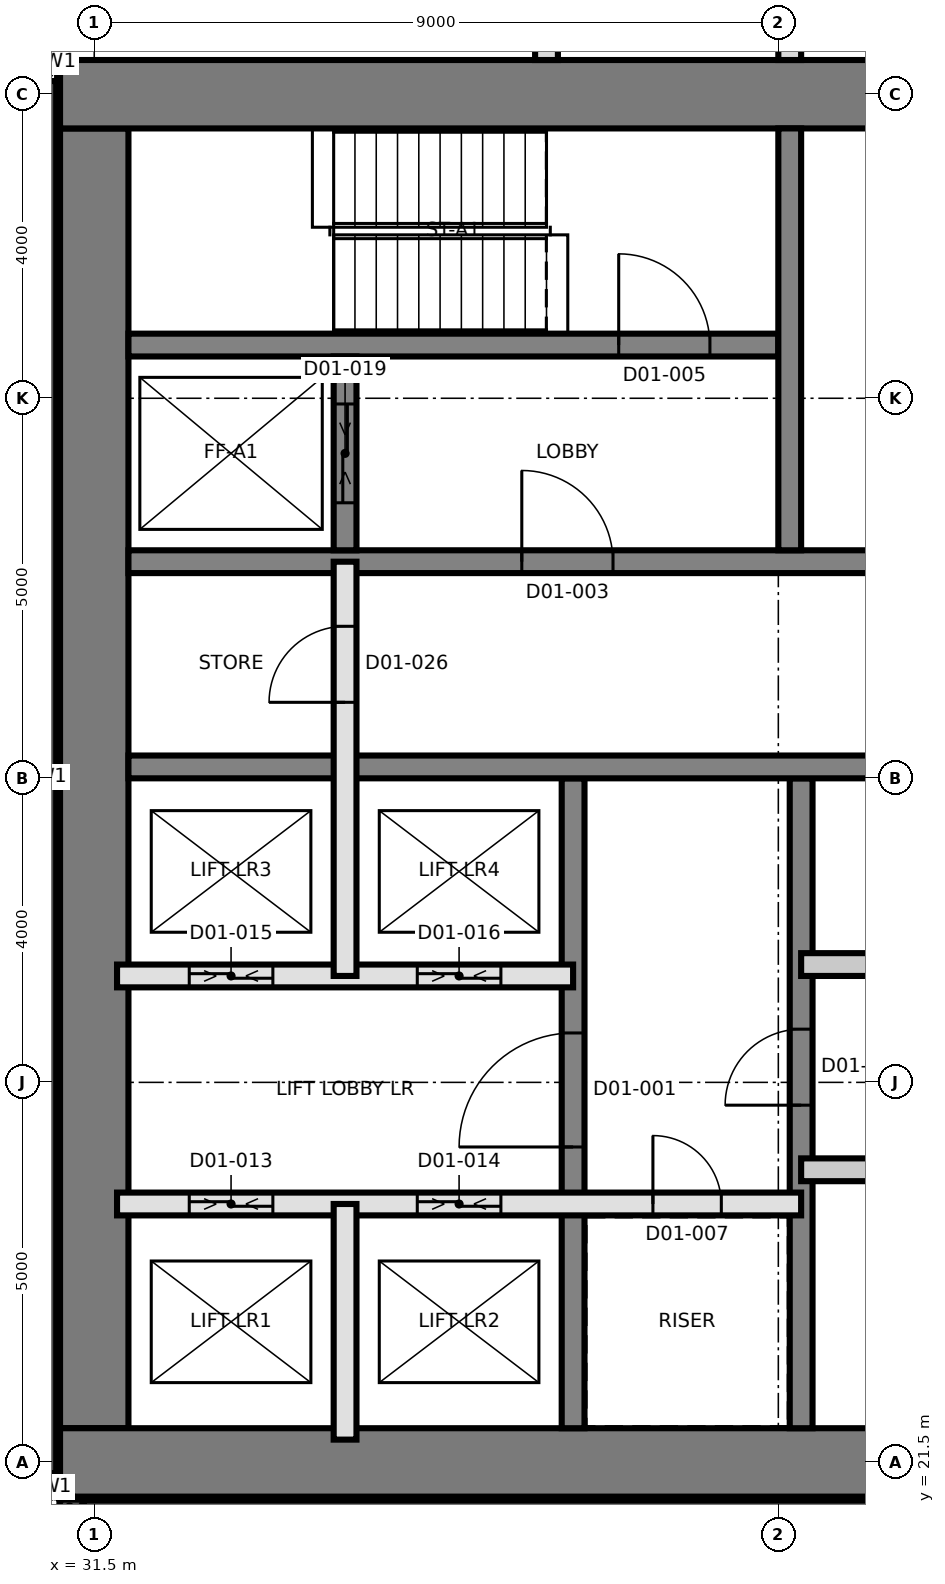
"""IFC4 building model, lengths in metres.
Left out: names, types, materials, properties, quantities, classifications, styles, units other than length and angle.
Written with IfcOpenShell. Run it as: python <this file> out.ifc"""

import sys

from ifc_helpers import new_model, si_unit, direction, frame, frame_2d, origin, place, context, subcontext, project, spatial, rectangle, extrude, element, fill, save


model = new_model("IFC4")
c1 = context("Model", 3, precision=1e-05, world=origin(), true_north=direction((0.0, 1.0)))
c2 = subcontext(c1, "Body", "Model", "MODEL_VIEW")
j1 = project(units=[si_unit("LENGTHUNIT", "METRE"), si_unit("PLANEANGLEUNIT", "RADIAN")], contexts=[c1])
p1 = place(None, origin())
s1 = spatial("IfcSite", under=j1, at=p1, CompositionType="ELEMENT")
p2 = place(p1, origin())
s2 = spatial("IfcBuilding", under=s1, at=p2, CompositionType="ELEMENT")
p3 = place(p2, frame((0.0, 0.0, 40.9)))
s3 = spatial("IfcBuildingStorey", under=s2, at=p3, CompositionType="ELEMENT", Elevation=40.9)
p4 = place(p3, frame((31.5, 21.95, 0.0), z_axis=(0.0, 0.0, 1.0), x_axis=(0.0, 1.0, 0.0)))
e1 = element("IfcWall", 1, at=p4, inside=s3, PredefinedType="SHEAR", context=c2, shape_type="SweptSolid", body=[
    extrude(rectangle(XDim=17.1, YDim=0.9, at=frame_2d((8.55, 0.0))), origin(), (0.0, 0.0, 1.0), 3.7),
])
p5 = place(p3, frame((31.05, 21.5, 0.0), z_axis=(0.0, 0.0, 1.0), x_axis=(1.0, 0.0, 0.0)))
e2 = element("IfcWall", 2, at=p5, inside=s3, PredefinedType="SHEAR", context=c2, shape_type="SweptSolid", body=[
    extrude(rectangle(XDim=27.0, YDim=0.9, at=frame_2d((13.5, 0.0))), origin(), (0.0, 0.0, 1.0), 3.7),
])
p6 = place(p3, frame((31.05, 39.5, 0.0), z_axis=(0.0, 0.0, 1.0), x_axis=(1.0, 0.0, 0.0)))
e3 = element("IfcWall", 3, at=p6, inside=s3, PredefinedType="SHEAR", context=c2, shape_type="SweptSolid", body=[
    extrude(rectangle(XDim=27.0, YDim=0.9, at=frame_2d((13.5, 0.0))), origin(), (0.0, 0.0, 1.0), 3.7),
])
p7 = place(p6, frame((10.65, 0.0, 0.0)))
e4 = element("IfcOpeningElement", 4, at=p7, cuts=e3, PredefinedType="OPENING", context=c2, shape_type="SweptSolid", body=[
    extrude(rectangle(XDim=1.2, YDim=2.1, at=frame_2d((0.6, 1.05))), frame((0.0, 0.46, 0.0), z_axis=(0.0, -1.0, 0.0), x_axis=(1.0, 0.0, 0.0)), (0.0, 0.0, 1.0), 0.92),
])
p8 = place(p3, frame((37.8, 21.95, 0.0), z_axis=(0.0, 0.0, 1.0), x_axis=(0.0, 1.0, 0.0)))
e5 = element("IfcWall", 5, at=p8, inside=s3, PredefinedType="SHEAR", context=c2, shape_type="SweptSolid", body=[
    extrude(rectangle(XDim=8.55, YDim=0.3, at=frame_2d((4.275, 0.0))), origin(), (0.0, 0.0, 1.0), 3.7),
])
p9 = place(p8, frame((3.7, 0.0, 0.0)))
e6 = element("IfcOpeningElement", 6, at=p9, cuts=e5, PredefinedType="OPENING", context=c2, shape_type="SweptSolid", body=[
    extrude(rectangle(XDim=1.5, YDim=2.1, at=frame_2d((0.75, 1.05))), frame((0.0, 0.16, 0.0), z_axis=(0.0, -1.0, 0.0), x_axis=(1.0, 0.0, 0.0)), (0.0, 0.0, 1.0), 0.32),
])
p10 = place(p3, frame((40.8, 21.95, 0.0), z_axis=(0.0, 0.0, 1.0), x_axis=(0.0, 1.0, 0.0)))
e7 = element("IfcWall", 7, at=p10, inside=s3, PredefinedType="SHEAR", context=c2, shape_type="SweptSolid", body=[
    extrude(rectangle(XDim=8.55, YDim=0.3, at=frame_2d((4.275, 0.0))), origin(), (0.0, 0.0, 1.0), 3.7),
])
p11 = place(p10, frame((4.25, 0.0, 0.0)))
e8 = element("IfcOpeningElement", 8, at=p11, cuts=e7, PredefinedType="OPENING", context=c2, shape_type="SweptSolid", body=[
    extrude(rectangle(XDim=1.0, YDim=2.1, at=frame_2d((0.5, 1.05))), frame((0.0, 0.16, 0.0), z_axis=(0.0, -1.0, 0.0), x_axis=(1.0, 0.0, 0.0)), (0.0, 0.0, 1.0), 0.32),
])
p12 = place(p3, frame((31.95, 30.65, 0.0), z_axis=(0.0, 0.0, 1.0), x_axis=(1.0, 0.0, 0.0)))
e9 = element("IfcWall", 9, at=p12, inside=s3, PredefinedType="SHEAR", context=c2, shape_type="SweptSolid", body=[
    extrude(rectangle(XDim=26.1, YDim=0.3, at=frame_2d((13.05, 0.0))), origin(), (0.0, 0.0, 1.0), 3.7),
])
p13 = place(p12, frame((24.55, 0.0, 0.0)))
e10 = element("IfcOpeningElement", 10, at=p13, cuts=e9, PredefinedType="OPENING", context=c2, shape_type="SweptSolid", body=[
    extrude(rectangle(XDim=1.0, YDim=2.1, at=frame_2d((0.5, 1.05))), frame((0.0, 0.16, 0.0), z_axis=(0.0, -1.0, 0.0), x_axis=(1.0, 0.0, 0.0)), (0.0, 0.0, 1.0), 0.32),
])
p14 = place(p12, frame((11.35, 0.0, 0.0)))
e11 = element("IfcOpeningElement", 11, at=p14, cuts=e9, PredefinedType="OPENING", context=c2, shape_type="SweptSolid", body=[
    extrude(rectangle(XDim=1.0, YDim=2.1, at=frame_2d((0.5, 1.05))), frame((0.0, 0.16, 0.0), z_axis=(0.0, -1.0, 0.0), x_axis=(1.0, 0.0, 0.0)), (0.0, 0.0, 1.0), 0.32),
])
p15 = place(p3, frame((31.95, 33.35, 0.0), z_axis=(0.0, 0.0, 1.0), x_axis=(1.0, 0.0, 0.0)))
e12 = element("IfcWall", 12, at=p15, inside=s3, PredefinedType="SHEAR", context=c2, shape_type="SweptSolid", body=[
    extrude(rectangle(XDim=26.1, YDim=0.3, at=frame_2d((13.05, 0.0))), origin(), (0.0, 0.0, 1.0), 3.7),
])
p16 = place(p15, frame((13.7, 0.0, 0.0)))
e13 = element("IfcOpeningElement", 13, at=p16, cuts=e12, PredefinedType="OPENING", context=c2, shape_type="SweptSolid", body=[
    extrude(rectangle(XDim=1.4, YDim=2.1, at=frame_2d((0.7, 1.05))), frame((0.0, 0.16, 0.0), z_axis=(0.0, -1.0, 0.0), x_axis=(1.0, 0.0, 0.0)), (0.0, 0.0, 1.0), 0.32),
])
p17 = place(p15, frame((5.175, 0.0, 0.0)))
e14 = element("IfcOpeningElement", 14, at=p17, cuts=e12, PredefinedType="OPENING", context=c2, shape_type="SweptSolid", body=[
    extrude(rectangle(XDim=1.2, YDim=2.1, at=frame_2d((0.6, 1.05))), frame((0.0, 0.16, 0.0), z_axis=(0.0, -1.0, 0.0), x_axis=(1.0, 0.0, 0.0)), (0.0, 0.0, 1.0), 0.32),
])
p18 = place(p15, frame((19.725, 0.0, 0.0)))
e15 = element("IfcOpeningElement", 15, at=p18, cuts=e12, PredefinedType="OPENING", context=c2, shape_type="SweptSolid", body=[
    extrude(rectangle(XDim=1.2, YDim=2.1, at=frame_2d((0.6, 1.05))), frame((0.0, 0.16, 0.0), z_axis=(0.0, -1.0, 0.0), x_axis=(1.0, 0.0, 0.0)), (0.0, 0.0, 1.0), 0.32),
])
p19 = place(p3, frame((31.95, 36.2, 0.0), z_axis=(0.0, 0.0, 1.0), x_axis=(1.0, 0.0, 0.0)))
e16 = element("IfcWall", 16, at=p19, inside=s3, PredefinedType="SHEAR", context=c2, shape_type="SweptSolid", body=[
    extrude(rectangle(XDim=8.55, YDim=0.3, at=frame_2d((4.275, 0.0))), origin(), (0.0, 0.0, 1.0), 3.7),
])
p20 = place(p19, frame((6.45, 0.0, 0.0)))
e17 = element("IfcOpeningElement", 17, at=p20, cuts=e16, PredefinedType="OPENING", context=c2, shape_type="SweptSolid", body=[
    extrude(rectangle(XDim=1.2, YDim=2.1, at=frame_2d((0.6, 1.05))), frame((0.0, 0.16, 0.0), z_axis=(0.0, -1.0, 0.0), x_axis=(1.0, 0.0, 0.0)), (0.0, 0.0, 1.0), 0.32),
])
p21 = place(p3, frame((40.65, 33.5, 0.0), z_axis=(0.0, 0.0, 1.0), x_axis=(0.0, 1.0, 0.0)))
e18 = element("IfcWall", 18, at=p21, inside=s3, PredefinedType="SHEAR", context=c2, shape_type="SweptSolid", body=[
    extrude(rectangle(XDim=5.55, YDim=0.3, at=frame_2d((2.775, 0.0))), origin(), (0.0, 0.0, 1.0), 3.7),
])
p22 = place(p3, frame((34.8, 33.5, 0.0), z_axis=(0.0, 0.0, 1.0), x_axis=(0.0, 1.0, 0.0)))
e19 = element("IfcWall", 19, at=p22, inside=s3, PredefinedType="SHEAR", context=c2, shape_type="SweptSolid", body=[
    extrude(rectangle(XDim=2.55, YDim=0.3, at=frame_2d((1.275, 0.0))), origin(), (0.0, 0.0, 1.0), 3.7),
])
p23 = place(p22, frame((0.625, 0.0, 0.0)))
e20 = element("IfcOpeningElement", 20, at=p23, cuts=e19, PredefinedType="OPENING", context=c2, shape_type="SweptSolid", body=[
    extrude(rectangle(XDim=1.3, YDim=2.4, at=frame_2d((0.65, 1.2))), frame((0.0, 0.16, 0.0), z_axis=(0.0, -1.0, 0.0), x_axis=(1.0, 0.0, 0.0)), (0.0, 0.0, 1.0), 0.32),
])
p24 = place(p3, frame((30.85, 39.674, 0.0), z_axis=(0.0, 0.0, 1.0), x_axis=(0.0, -1.0, 0.0)))
e21 = element("IfcWall", 21, at=p24, inside=s3, PredefinedType="SOLIDWALL", context=c2, shape_type="SweptSolid", body=[
    extrude(rectangle(XDim=18.314, YDim=0.3, at=frame_2d((9.157, 0.0))), origin(), (0.0, 0.0, 1.0), 3.4),
])
for number, where, z_axis, x_axis in (
    (22, (30.861, 21.302, 0.0), (0.0, 0.0, 1.0), (0.383, -0.924, 0.0)),
    (23, (31.048, 20.967, 0.0), (0.0, 0.0, 1.0), (0.924, -0.383, 0.0)),
):
    element("IfcWall", number, at=place(p3, frame(where, z_axis=z_axis, x_axis=x_axis)), inside=s3, PredefinedType="SOLIDWALL", context=c2, shape_type="SweptSolid", body=[
        extrude(rectangle(XDim=0.275, YDim=0.3, at=frame_2d((0.138, 0.0))), origin(), (0.0, 0.0, 1.0), 3.4),
    ])
p25 = place(p3, frame((31.36, 20.85, 0.0), z_axis=(0.0, 0.0, 1.0), x_axis=(1.0, 0.0, 0.0)))
e24 = element("IfcWall", 24, at=p25, inside=s3, PredefinedType="SOLIDWALL", context=c2, shape_type="SweptSolid", body=[
    extrude(rectangle(XDim=27.281, YDim=0.3, at=frame_2d((13.64, 0.0))), origin(), (0.0, 0.0, 1.0), 3.4),
])
p26 = place(p3, frame((31.8, 24.9, 0.0), z_axis=(0.0, 0.0, 1.0), x_axis=(1.0, 0.0, 0.0)))
e25 = element("IfcWall", 25, at=p26, inside=s3, PredefinedType="SOLIDWALL", context=c2, shape_type="SweptSolid", body=[
    extrude(rectangle(XDim=9.0, YDim=0.3, at=frame_2d((4.5, 0.0))), origin(), (0.0, 0.0, 1.0), 3.4),
])
p27 = place(p26, frame((7.05, 0.0, 0.0)))
e26 = element("IfcOpeningElement", 26, at=p27, cuts=e25, PredefinedType="OPENING", context=c2, shape_type="SweptSolid", body=[
    extrude(rectangle(XDim=0.9, YDim=2.1, at=frame_2d((0.45, 1.05))), frame((0.0, 0.16, 0.0), z_axis=(0.0, -1.0, 0.0), x_axis=(1.0, 0.0, 0.0)), (0.0, 0.0, 1.0), 0.32),
])
p28 = place(p26, frame((0.95, 0.0, 0.0)))
e27 = element("IfcOpeningElement", 27, at=p28, cuts=e25, PredefinedType="OPENING", context=c2, shape_type="SweptSolid", body=[
    extrude(rectangle(XDim=1.1, YDim=2.4, at=frame_2d((0.55, 1.2))), frame((0.0, 0.16, 0.0), z_axis=(0.0, -1.0, 0.0), x_axis=(1.0, 0.0, 0.0)), (0.0, 0.0, 1.0), 0.32),
])
p29 = place(p26, frame((3.95, 0.0, 0.0)))
e28 = element("IfcOpeningElement", 28, at=p29, cuts=e25, PredefinedType="OPENING", context=c2, shape_type="SweptSolid", body=[
    extrude(rectangle(XDim=1.1, YDim=2.4, at=frame_2d((0.55, 1.2))), frame((0.0, 0.16, 0.0), z_axis=(0.0, -1.0, 0.0), x_axis=(1.0, 0.0, 0.0)), (0.0, 0.0, 1.0), 0.32),
])
p30 = place(p3, frame((40.8, 25.35, 0.0), z_axis=(0.0, 0.0, 1.0), x_axis=(1.0, 0.0, 0.0)))
e29 = element("IfcWall", 29, at=p30, inside=s3, PredefinedType="PARTITIONING", context=c2, shape_type="SweptSolid", body=[
    extrude(rectangle(XDim=6.0, YDim=0.3, at=frame_2d((3.0, 0.0))), origin(), (0.0, 0.0, 1.0), 3.4),
])
p31 = place(p30, frame((2.5, 0.0, 0.0)))
e30 = element("IfcOpeningElement", 30, at=p31, cuts=e29, PredefinedType="OPENING", context=c2, shape_type="SweptSolid", body=[
    extrude(rectangle(XDim=1.0, YDim=2.1, at=frame_2d((0.5, 1.05))), frame((0.0, 0.16, 0.0), z_axis=(0.0, -1.0, 0.0), x_axis=(1.0, 0.0, 0.0)), (0.0, 0.0, 1.0), 0.32),
])
p32 = place(p3, frame((31.8, 27.9, 0.0), z_axis=(0.0, 0.0, 1.0), x_axis=(1.0, 0.0, 0.0)))
e31 = element("IfcWall", 31, at=p32, inside=s3, PredefinedType="SOLIDWALL", context=c2, shape_type="SweptSolid", body=[
    extrude(rectangle(XDim=6.0, YDim=0.3, at=frame_2d((3.0, 0.0))), origin(), (0.0, 0.0, 1.0), 3.4),
])
p33 = place(p32, frame((0.95, 0.0, 0.0)))
e32 = element("IfcOpeningElement", 32, at=p33, cuts=e31, PredefinedType="OPENING", context=c2, shape_type="SweptSolid", body=[
    extrude(rectangle(XDim=1.1, YDim=2.4, at=frame_2d((0.55, 1.2))), frame((0.0, 0.16, 0.0), z_axis=(0.0, -1.0, 0.0), x_axis=(1.0, 0.0, 0.0)), (0.0, 0.0, 1.0), 0.32),
])
p34 = place(p32, frame((3.95, 0.0, 0.0)))
e33 = element("IfcOpeningElement", 33, at=p34, cuts=e31, PredefinedType="OPENING", context=c2, shape_type="SweptSolid", body=[
    extrude(rectangle(XDim=1.1, YDim=2.4, at=frame_2d((0.55, 1.2))), frame((0.0, 0.16, 0.0), z_axis=(0.0, -1.0, 0.0), x_axis=(1.0, 0.0, 0.0)), (0.0, 0.0, 1.0), 0.32),
])
p35 = place(p3, frame((40.8, 28.05, 0.0), z_axis=(0.0, 0.0, 1.0), x_axis=(1.0, 0.0, 0.0)))
e34 = element("IfcWall", 34, at=p35, inside=s3, PredefinedType="PARTITIONING", context=c2, shape_type="SweptSolid", body=[
    extrude(rectangle(XDim=6.0, YDim=0.3, at=frame_2d((3.0, 0.0))), origin(), (0.0, 0.0, 1.0), 3.4),
])
p36 = place(p3, frame((34.8, 21.8, 0.0), z_axis=(0.0, 0.0, 1.0), x_axis=(0.0, 1.0, 0.0)))
e35 = element("IfcWall", 35, at=p36, inside=s3, PredefinedType="SOLIDWALL", context=c2, shape_type="SweptSolid", body=[
    extrude(rectangle(XDim=3.1, YDim=0.3, at=frame_2d((1.55, 0.0))), origin(), (0.0, 0.0, 1.0), 3.4),
])
p37 = place(p3, frame((34.8, 27.9, 0.0), z_axis=(0.0, 0.0, 1.0), x_axis=(0.0, 1.0, 0.0)))
e36 = element("IfcWall", 36, at=p37, inside=s3, PredefinedType="SOLIDWALL", context=c2, shape_type="SweptSolid", body=[
    extrude(rectangle(XDim=5.45, YDim=0.3, at=frame_2d((2.725, 0.0))), origin(), (0.0, 0.0, 1.0), 3.4),
])
p38 = place(p37, frame((3.6, 0.0, 0.0)))
e37 = element("IfcOpeningElement", 37, at=p38, cuts=e36, PredefinedType="OPENING", context=c2, shape_type="SweptSolid", body=[
    extrude(rectangle(XDim=1.0, YDim=2.1, at=frame_2d((0.5, 1.05))), frame((0.0, 0.16, 0.0), z_axis=(0.0, -1.0, 0.0), x_axis=(1.0, 0.0, 0.0)), (0.0, 0.0, 1.0), 0.32),
])
p39 = place(p3, frame((37.45, 39.95, 0.0), z_axis=(0.0, 0.0, 1.0), x_axis=(0.0, 1.0, 0.0)))
e38 = element("IfcWall", 38, at=p39, inside=s3, PredefinedType="PARTITIONING", context=c2, shape_type="SweptSolid", body=[
    extrude(rectangle(XDim=2.25, YDim=0.3, at=frame_2d((1.125, 0.0))), origin(), (0.0, 0.0, 1.0), 3.4),
])
p40 = place(p39, frame((0.5, 0.0, 0.0)))
e39 = element("IfcOpeningElement", 39, at=p40, cuts=e38, PredefinedType="OPENING", context=c2, shape_type="SweptSolid", body=[
    extrude(rectangle(XDim=0.8, YDim=2.1, at=frame_2d((0.4, 1.05))), frame((0.0, 0.16, 0.0), z_axis=(0.0, -1.0, 0.0), x_axis=(1.0, 0.0, 0.0)), (0.0, 0.0, 1.0), 0.32),
])
p41 = place(p3, frame((40.65, 39.95, 0.0), z_axis=(0.0, 0.0, 1.0), x_axis=(0.0, 1.0, 0.0)))
e40 = element("IfcWall", 40, at=p41, inside=s3, PredefinedType="PARTITIONING", context=c2, shape_type="SweptSolid", body=[
    extrude(rectangle(XDim=35.625, YDim=0.3, at=frame_2d((17.812, 0.0))), origin(), (0.0, 0.0, 1.0), 3.4),
])
p42 = place(p41, frame((2.83, 0.0, 0.0)))
e41 = element("IfcOpeningElement", 41, at=p42, cuts=e40, PredefinedType="OPENING", context=c2, shape_type="SweptSolid", body=[
    extrude(rectangle(XDim=1.0, YDim=2.1, at=frame_2d((0.5, 1.05))), frame((0.0, 0.16, 0.0), z_axis=(0.0, -1.0, 0.0), x_axis=(1.0, 0.0, 0.0)), (0.0, 0.0, 1.0), 0.32),
])
p43 = place(p41, frame((4.63, 0.0, 0.0)))
e42 = element("IfcOpeningElement", 42, at=p43, cuts=e40, PredefinedType="OPENING", context=c2, shape_type="SweptSolid", body=[
    extrude(rectangle(XDim=1.0, YDim=2.1, at=frame_2d((0.5, 1.05))), frame((0.0, 0.16, 0.0), z_axis=(0.0, -1.0, 0.0), x_axis=(1.0, 0.0, 0.0)), (0.0, 0.0, 1.0), 0.32),
])
p44 = place(p41, frame((11.47, 0.0, 0.0)))
e43 = element("IfcOpeningElement", 43, at=p44, cuts=e40, PredefinedType="OPENING", context=c2, shape_type="SweptSolid", body=[
    extrude(rectangle(XDim=1.0, YDim=2.1, at=frame_2d((0.5, 1.05))), frame((0.0, 0.16, 0.0), z_axis=(0.0, -1.0, 0.0), x_axis=(1.0, 0.0, 0.0)), (0.0, 0.0, 1.0), 0.32),
])
p45 = place(p41, frame((13.27, 0.0, 0.0)))
e44 = element("IfcOpeningElement", 44, at=p45, cuts=e40, PredefinedType="OPENING", context=c2, shape_type="SweptSolid", body=[
    extrude(rectangle(XDim=1.0, YDim=2.1, at=frame_2d((0.5, 1.05))), frame((0.0, 0.16, 0.0), z_axis=(0.0, -1.0, 0.0), x_axis=(1.0, 0.0, 0.0)), (0.0, 0.0, 1.0), 0.32),
])
p46 = place(p41, frame((21.05, 0.0, 0.0)))
e45 = element("IfcOpeningElement", 45, at=p46, cuts=e40, PredefinedType="OPENING", context=c2, shape_type="SweptSolid", body=[
    extrude(rectangle(XDim=1.0, YDim=2.4, at=frame_2d((0.5, 1.2))), frame((0.0, 0.16, 0.0), z_axis=(0.0, -1.0, 0.0), x_axis=(1.0, 0.0, 0.0)), (0.0, 0.0, 1.0), 0.32),
])
p47 = place(p9, origin())
e46 = element("IfcDoor", 46, at=p47, inside=s3, OperationType="SINGLE_SWING_LEFT", PredefinedType="DOOR", context=c2, shape_type="SweptSolid", body=[
    extrude(rectangle(XDim=1.5, YDim=2.1, at=frame_2d((0.75, 1.05))), frame((0.0, 0.025, 0.0), z_axis=(0.0, -1.0, 0.0), x_axis=(1.0, 0.0, 0.0)), (0.0, 0.0, 1.0), 0.05),
])
fill(e6, e46)
p48 = place(p17, origin())
e47 = element("IfcDoor", 47, at=p48, inside=s3, OperationType="SINGLE_SWING_LEFT", PredefinedType="DOOR", context=c2, shape_type="SweptSolid", body=[
    extrude(rectangle(XDim=1.2, YDim=2.1, at=frame_2d((0.6, 1.05))), frame((0.0, 0.025, 0.0), z_axis=(0.0, -1.0, 0.0), x_axis=(1.0, 0.0, 0.0)), (0.0, 0.0, 1.0), 0.05),
])
fill(e14, e47)
p49 = place(p20, origin())
e48 = element("IfcDoor", 48, at=p49, inside=s3, OperationType="SINGLE_SWING_RIGHT", PredefinedType="DOOR", context=c2, shape_type="SweptSolid", body=[
    extrude(rectangle(XDim=1.2, YDim=2.1, at=frame_2d((0.6, 1.05))), frame((0.0, 0.025, 0.0), z_axis=(0.0, -1.0, 0.0), x_axis=(1.0, 0.0, 0.0)), (0.0, 0.0, 1.0), 0.05),
])
fill(e17, e48)
p50 = place(p27, origin())
e49 = element("IfcDoor", 49, at=p50, inside=s3, OperationType="SINGLE_SWING_LEFT", PredefinedType="DOOR", context=c2, shape_type="SweptSolid", body=[
    extrude(rectangle(XDim=0.9, YDim=2.1, at=frame_2d((0.45, 1.05))), frame((0.0, 0.025, 0.0), z_axis=(0.0, -1.0, 0.0), x_axis=(1.0, 0.0, 0.0)), (0.0, 0.0, 1.0), 0.05),
])
fill(e26, e49)
p51 = place(p28, origin())
e50 = element("IfcDoor", 50, at=p51, inside=s3, OperationType="SLIDING_TO_LEFT", PredefinedType="DOOR", context=c2, shape_type="SweptSolid", body=[
    extrude(rectangle(XDim=1.1, YDim=2.4, at=frame_2d((0.55, 1.2))), frame((0.0, 0.025, 0.0), z_axis=(0.0, -1.0, 0.0), x_axis=(1.0, 0.0, 0.0)), (0.0, 0.0, 1.0), 0.05),
])
fill(e27, e50)
p52 = place(p29, origin())
e51 = element("IfcDoor", 51, at=p52, inside=s3, OperationType="SLIDING_TO_LEFT", PredefinedType="DOOR", context=c2, shape_type="SweptSolid", body=[
    extrude(rectangle(XDim=1.1, YDim=2.4, at=frame_2d((0.55, 1.2))), frame((0.0, 0.025, 0.0), z_axis=(0.0, -1.0, 0.0), x_axis=(1.0, 0.0, 0.0)), (0.0, 0.0, 1.0), 0.05),
])
fill(e28, e51)
p53 = place(p33, origin())
e52 = element("IfcDoor", 52, at=p53, inside=s3, OperationType="SLIDING_TO_LEFT", PredefinedType="DOOR", context=c2, shape_type="SweptSolid", body=[
    extrude(rectangle(XDim=1.1, YDim=2.4, at=frame_2d((0.55, 1.2))), frame((0.0, 0.025, 0.0), z_axis=(0.0, -1.0, 0.0), x_axis=(1.0, 0.0, 0.0)), (0.0, 0.0, 1.0), 0.05),
])
fill(e32, e52)
p54 = place(p34, origin())
e53 = element("IfcDoor", 53, at=p54, inside=s3, OperationType="SLIDING_TO_LEFT", PredefinedType="DOOR", context=c2, shape_type="SweptSolid", body=[
    extrude(rectangle(XDim=1.1, YDim=2.4, at=frame_2d((0.55, 1.2))), frame((0.0, 0.025, 0.0), z_axis=(0.0, -1.0, 0.0), x_axis=(1.0, 0.0, 0.0)), (0.0, 0.0, 1.0), 0.05),
])
fill(e33, e53)
p55 = place(p23, origin())
e54 = element("IfcDoor", 54, at=p55, inside=s3, OperationType="SLIDING_TO_LEFT", PredefinedType="DOOR", context=c2, shape_type="SweptSolid", body=[
    extrude(rectangle(XDim=1.3, YDim=2.4, at=frame_2d((0.65, 1.2))), frame((0.0, 0.025, 0.0), z_axis=(0.0, -1.0, 0.0), x_axis=(1.0, 0.0, 0.0)), (0.0, 0.0, 1.0), 0.05),
])
fill(e20, e54)
p56 = place(p11, origin())
e55 = element("IfcDoor", 55, at=p56, inside=s3, OperationType="SINGLE_SWING_RIGHT", PredefinedType="DOOR", context=c2, shape_type="SweptSolid", body=[
    extrude(rectangle(XDim=1.0, YDim=2.1, at=frame_2d((0.5, 1.05))), frame((0.0, 0.025, 0.0), z_axis=(0.0, -1.0, 0.0), x_axis=(1.0, 0.0, 0.0)), (0.0, 0.0, 1.0), 0.05),
])
fill(e8, e55)
p57 = place(p38, origin())
e56 = element("IfcDoor", 56, at=p57, inside=s3, OperationType="SINGLE_SWING_RIGHT", PredefinedType="DOOR", context=c2, shape_type="SweptSolid", body=[
    extrude(rectangle(XDim=1.0, YDim=2.1, at=frame_2d((0.5, 1.05))), frame((0.0, 0.025, 0.0), z_axis=(0.0, -1.0, 0.0), x_axis=(1.0, 0.0, 0.0)), (0.0, 0.0, 1.0), 0.05),
])
fill(e37, e56)
save(model, sys.argv[1])
